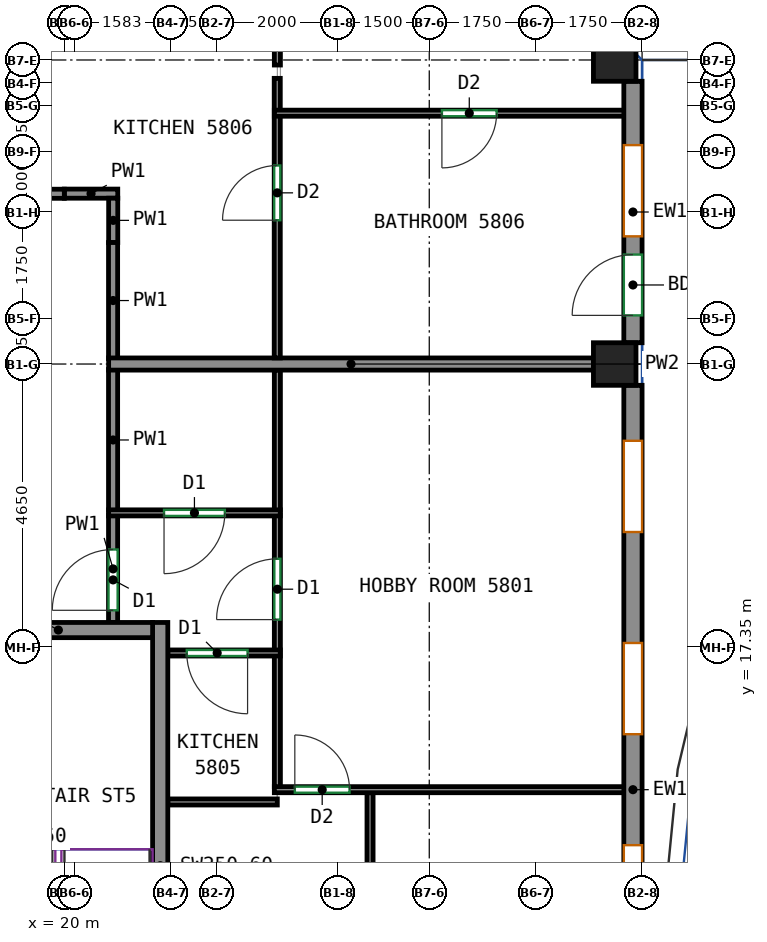
"""IFC4 building model, lengths in metres.
Left out: names, types, materials, properties, quantities, classifications, styles, units other than length and angle.
Written with IfcOpenShell. Run it as: python <this file> out.ifc"""

import sys

from ifc_helpers import new_model, si_unit, direction, frame, frame_2d, origin, origin_2d, place, context, subcontext, project, spatial, rectangle, extrude, source, transform, mapped, element, fill, save


model = new_model("IFC4")
c1 = context("Model", 3, precision=1e-05, world=origin(), true_north=direction((0.0, 1.0)))
c2 = subcontext(c1, "Body", "Model", "MODEL_VIEW")
j1 = project(units=[si_unit("LENGTHUNIT", "METRE"), si_unit("PLANEANGLEUNIT", "RADIAN")], contexts=[c1])
p1 = place(None, origin())
s1 = spatial("IfcSite", under=j1, at=p1, CompositionType="ELEMENT")
p2 = place(p1, origin())
s2 = spatial("IfcBuilding", under=s1, at=p2, CompositionType="ELEMENT")
p3 = place(p2, frame((0.0, 0.0, 242.4)))
s3 = spatial("IfcBuildingStorey", under=s2, at=p3, CompositionType="ELEMENT", Elevation=242.4)
m1 = source(origin(), c2, "Body", "SweptSolid", [
    extrude(rectangle(XDim=0.7, YDim=0.7, at=origin_2d()), origin(), (0.0, 0.0, 1.0), 3.12),
])
for number, where, z_axis, x_axis in (
    (1, (29.05, 22.0, 0.0), (0.0, 0.0, 1.0), (1.0, 0.0, 0.0)),
    (2, (29.05, 27.0, 0.0), (0.0, 0.0, 1.0), (1.0, 0.0, 0.0)),
):
    element("IfcColumn", number, at=place(p3, frame(where, z_axis=z_axis, x_axis=x_axis)), inside=s3, PredefinedType="COLUMN", context=c2, shape_type="MappedRepresentation", body=[
        mapped(m1, transform((0.0, 0.0, 0.0))),
    ])
m2 = source(origin(), c2, "Body", "SweptSolid", [
    extrude(rectangle(XDim=8.0, YDim=0.25, at=frame_2d((4.0, 0.0))), origin(), (0.0, 0.0, 1.0), 3.12),
])
p4 = place(p3, frame((21.575, 9.75, 0.0), z_axis=(0.0, 0.0, 1.0), x_axis=(0.0, 1.0, 0.0)))
e3 = element("IfcWall", 3, at=p4, inside=s3, PredefinedType="SHEAR", context=c2, shape_type="MappedRepresentation", body=[
    mapped(m2, transform((0.0, 0.0, 0.0))),
])
m3 = source(origin(), c2, "Body", "SweptSolid", [
    extrude(rectangle(XDim=3.1, YDim=0.25, at=frame_2d((1.55, 0.0))), origin(), (0.0, 0.0, 1.0), 3.12),
])
p5 = place(p3, frame((18.35, 17.625, 0.0), z_axis=(0.0, 0.0, 1.0), x_axis=(1.0, 0.0, 0.0)))
e4 = element("IfcWall", 4, at=p5, inside=s3, PredefinedType="SHEAR", context=c2, shape_type="MappedRepresentation", body=[
    mapped(m3, transform((0.0, 0.0, 0.0))),
])
m4 = source(origin(), c2, "Body", "SweptSolid", [
    extrude(rectangle(XDim=13.3, YDim=0.3, at=frame_2d((6.65, 0.0))), origin(), (0.0, 0.0, 1.0), 3.12),
])
p6 = place(p3, frame((29.35, 8.35, 0.0), z_axis=(0.0, 0.0, 1.0), x_axis=(0.0, 1.0, 0.0)))
e5 = element("IfcWall", 5, at=p6, inside=s3, PredefinedType="SOLIDWALL", context=c2, shape_type="MappedRepresentation", body=[
    mapped(m4, transform((0.0, 0.0, 0.0))),
])
p7 = place(p6, frame((0.913, 0.0, 0.8)))
e6 = element("IfcOpeningElement", 6, at=p7, cuts=e5, PredefinedType="OPENING", context=c2, shape_type="SweptSolid", body=[
    extrude(rectangle(XDim=1.5, YDim=2.05, at=frame_2d((0.75, 1.025))), frame((0.0, 0.16, 0.0), z_axis=(0.0, -1.0, 0.0), x_axis=(1.0, 0.0, 0.0)), (0.0, 0.0, 1.0), 0.32),
])
p8 = place(p6, frame((4.238, 0.0, 0.8)))
e7 = element("IfcOpeningElement", 7, at=p8, cuts=e5, PredefinedType="OPENING", context=c2, shape_type="SweptSolid", body=[
    extrude(rectangle(XDim=1.5, YDim=2.05, at=frame_2d((0.75, 1.025))), frame((0.0, 0.16, 0.0), z_axis=(0.0, -1.0, 0.0), x_axis=(1.0, 0.0, 0.0)), (0.0, 0.0, 1.0), 0.32),
])
p9 = place(p6, frame((7.562, 0.0, 0.8)))
e8 = element("IfcOpeningElement", 8, at=p9, cuts=e5, PredefinedType="OPENING", context=c2, shape_type="SweptSolid", body=[
    extrude(rectangle(XDim=1.5, YDim=2.05, at=frame_2d((0.75, 1.025))), frame((0.0, 0.16, 0.0), z_axis=(0.0, -1.0, 0.0), x_axis=(1.0, 0.0, 0.0)), (0.0, 0.0, 1.0), 0.32),
])
p10 = place(p6, frame((10.887, 0.0, 0.8)))
e9 = element("IfcOpeningElement", 9, at=p10, cuts=e5, PredefinedType="OPENING", context=c2, shape_type="SweptSolid", body=[
    extrude(rectangle(XDim=1.5, YDim=2.05, at=frame_2d((0.75, 1.025))), frame((0.0, 0.16, 0.0), z_axis=(0.0, -1.0, 0.0), x_axis=(1.0, 0.0, 0.0)), (0.0, 0.0, 1.0), 0.32),
])
m5 = source(origin(), c2, "Body", "SweptSolid", [
    extrude(rectangle(XDim=4.3, YDim=0.3, at=frame_2d((2.15, 0.0))), origin(), (0.0, 0.0, 1.0), 3.12),
])
p11 = place(p3, frame((29.35, 22.35, 0.0), z_axis=(0.0, 0.0, 1.0), x_axis=(0.0, 1.0, 0.0)))
e10 = element("IfcWall", 10, at=p11, inside=s3, PredefinedType="SOLIDWALL", context=c2, shape_type="MappedRepresentation", body=[
    mapped(m5, transform((0.0, 0.0, 0.0))),
])
p12 = place(p11, frame((1.75, 0.0, 0.8)))
e11 = element("IfcOpeningElement", 11, at=p12, cuts=e10, PredefinedType="OPENING", context=c2, shape_type="SweptSolid", body=[
    extrude(rectangle(XDim=1.5, YDim=2.05, at=frame_2d((0.75, 1.025))), frame((0.0, 0.16, 0.0), z_axis=(0.0, -1.0, 0.0), x_axis=(1.0, 0.0, 0.0)), (0.0, 0.0, 1.0), 0.32),
])
p13 = place(p11, frame((0.45, 0.0, 0.0)))
e12 = element("IfcOpeningElement", 12, at=p13, cuts=e10, PredefinedType="OPENING", context=c2, shape_type="SweptSolid", body=[
    extrude(rectangle(XDim=1.0, YDim=2.1, at=frame_2d((0.5, 1.05))), frame((0.0, 0.16, 0.0), z_axis=(0.0, -1.0, 0.0), x_axis=(1.0, 0.0, 0.0)), (0.0, 0.0, 1.0), 0.32),
])
p14 = place(p3, frame((20.8, 17.75, 0.0), z_axis=(0.0, 0.0, 1.0), x_axis=(0.0, 1.0, 0.0)))
e13 = element("IfcWall", 13, at=p14, inside=s3, PredefinedType="PARTITIONING", context=c2, shape_type="SweptSolid", body=[
    extrude(rectangle(XDim=1.762, YDim=0.15, at=frame_2d((0.881, 0.0))), origin(), (0.0, 0.0, 1.0), 3.12),
])
p15 = place(p14, frame((0.2, 0.0, 0.0)))
e14 = element("IfcOpeningElement", 14, at=p15, cuts=e13, PredefinedType="OPENING", context=c2, shape_type="SweptSolid", body=[
    extrude(rectangle(XDim=1.0, YDim=2.1, at=frame_2d((0.5, 1.05))), frame((0.0, 0.085, 0.0), z_axis=(0.0, -1.0, 0.0), x_axis=(1.0, 0.0, 0.0)), (0.0, 0.0, 1.0), 0.17),
])
p16 = place(p3, frame((20.8, 19.592, 0.0), z_axis=(0.0, 0.0, 1.0), x_axis=(0.0, 1.0, 0.0)))
e15 = element("IfcWall", 15, at=p16, inside=s3, PredefinedType="PARTITIONING", context=c2, shape_type="SweptSolid", body=[
    extrude(rectangle(XDim=2.318, YDim=0.15, at=frame_2d((1.159, 0.0))), origin(), (0.0, 0.0, 1.0), 3.12),
])
p17 = place(p3, frame((20.877, 24.802, 0.0), z_axis=(0.0, 0.0, 1.0), x_axis=(-1.0, 0.0, 0.0)))
e16 = element("IfcWall", 16, at=p17, inside=s3, PredefinedType="PARTITIONING", context=c2, shape_type="SweptSolid", body=[
    extrude(rectangle(XDim=0.879, YDim=0.15, at=frame_2d((0.439, 0.0))), origin(), (0.0, 0.0, 1.0), 3.12),
])
p18 = place(p3, frame((20.802, 23.998, 0.0), z_axis=(0.0, 0.0, 1.0), x_axis=(0.0, 1.0, 0.0)))
e17 = element("IfcWall", 17, at=p18, inside=s3, PredefinedType="PARTITIONING", context=c2, shape_type="SweptSolid", body=[
    extrude(rectangle(XDim=0.729, YDim=0.15, at=frame_2d((0.365, 0.0))), origin(), (0.0, 0.0, 1.0), 3.12),
])
p19 = place(p3, frame((20.8, 22.09, 0.0), z_axis=(0.0, 0.0, 1.0), x_axis=(0.0, 1.0, 0.0)))
e18 = element("IfcWall", 18, at=p19, inside=s3, PredefinedType="PARTITIONING", context=c2, shape_type="SweptSolid", body=[
    extrude(rectangle(XDim=1.908, YDim=0.15, at=frame_2d((0.954, 0.0))), origin(), (0.0, 0.0, 1.0), 3.12),
])
p20 = place(p3, frame((-16.075, 24.8, 0.0), z_axis=(0.0, 0.0, 1.0), x_axis=(1.0, 0.0, 0.0)))
e19 = element("IfcWall", 19, at=p20, inside=s3, PredefinedType="PARTITIONING", context=c2, shape_type="SweptSolid", body=[
    extrude(rectangle(XDim=36.073, YDim=0.15, at=frame_2d((18.037, 0.0))), origin(), (0.0, 0.0, 1.0), 3.12),
])
p21 = place(p20, frame((14.274, 0.0, 0.0)))
e20 = element("IfcOpeningElement", 20, at=p21, cuts=e19, PredefinedType="OPENING", context=c2, shape_type="SweptSolid", body=[
    extrude(rectangle(XDim=0.9, YDim=2.1, at=frame_2d((0.45, 1.05))), frame((0.0, 0.085, 0.0), z_axis=(0.0, -1.0, 0.0), x_axis=(1.0, 0.0, 0.0)), (0.0, 0.0, 1.0), 0.17),
])
p22 = place(p20, frame((28.875, 0.0, 0.0)))
e21 = element("IfcOpeningElement", 21, at=p22, cuts=e19, PredefinedType="OPENING", context=c2, shape_type="SweptSolid", body=[
    extrude(rectangle(XDim=1.0, YDim=2.1, at=frame_2d((0.5, 1.05))), frame((0.0, 0.085, 0.0), z_axis=(0.0, -1.0, 0.0), x_axis=(1.0, 0.0, 0.0)), (0.0, 0.0, 1.0), 0.17),
])
p23 = place(p3, frame((25.026, 8.1, 0.0), z_axis=(0.0, 0.0, 1.0), x_axis=(0.0, 1.0, 0.0)))
e22 = element("IfcWall", 22, at=p23, inside=s3, PredefinedType="PARTITIONING", context=c2, shape_type="SweptSolid", body=[
    extrude(rectangle(XDim=6.85, YDim=0.1, at=frame_2d((3.425, 0.0))), origin(), (0.0, 0.0, 1.0), 3.12),
])
p24 = place(p23, frame((1.613, 0.0, 0.0)))
e23 = element("IfcOpeningElement", 23, at=p24, cuts=e22, PredefinedType="OPENING", context=c2, shape_type="SweptSolid", body=[
    extrude(rectangle(XDim=0.9, YDim=2.1, at=frame_2d((0.45, 1.05))), frame((0.0, 0.06, 0.0), z_axis=(0.0, -1.0, 0.0), x_axis=(1.0, 0.0, 0.0)), (0.0, 0.0, 1.0), 0.12),
])
p25 = place(p3, frame((23.452, 15.0, 0.0), z_axis=(0.0, 0.0, 1.0), x_axis=(1.0, 0.0, 0.0)))
e24 = element("IfcWall", 24, at=p25, inside=s3, PredefinedType="PARTITIONING", context=c2, shape_type="SweptSolid", body=[
    extrude(rectangle(XDim=5.798, YDim=0.1, at=frame_2d((2.899, 0.0))), origin(), (0.0, 0.0, 1.0), 3.12),
])
p26 = place(p25, frame((0.337, 0.0, 0.0)))
e25 = element("IfcOpeningElement", 25, at=p26, cuts=e24, PredefinedType="OPENING", context=c2, shape_type="SweptSolid", body=[
    extrude(rectangle(XDim=0.9, YDim=2.1, at=frame_2d((0.45, 1.05))), frame((0.0, 0.06, 0.0), z_axis=(0.0, -1.0, 0.0), x_axis=(1.0, 0.0, 0.0)), (0.0, 0.0, 1.0), 0.12),
])
p27 = place(p3, frame((23.501, 14.798, 0.0), z_axis=(0.0, 0.0, 1.0), x_axis=(-1.0, 0.0, 0.0)))
e26 = element("IfcWall", 26, at=p27, inside=s3, PredefinedType="PARTITIONING", context=c2, shape_type="SweptSolid", body=[
    extrude(rectangle(XDim=1.801, YDim=0.1, at=frame_2d((0.9, 0.0))), origin(), (0.0, 0.0, 1.0), 3.12),
])
p28 = place(p3, frame((23.502, 15.05, 0.0), z_axis=(0.0, 0.0, 1.0), x_axis=(0.0, 1.0, 0.0)))
e27 = element("IfcWall", 27, at=p28, inside=s3, PredefinedType="PARTITIONING", context=c2, shape_type="SweptSolid", body=[
    extrude(rectangle(XDim=2.158, YDim=0.1, at=frame_2d((1.079, 0.0))), origin(), (0.0, 0.0, 1.0), 3.12),
])
p29 = place(p3, frame((23.502, 17.288, 0.0), z_axis=(0.0, 0.0, 1.0), x_axis=(0.0, 1.0, 0.0)))
e28 = element("IfcWall", 28, at=p29, inside=s3, PredefinedType="PARTITIONING", context=c2, shape_type="SweptSolid", body=[
    extrude(rectangle(XDim=2.224, YDim=0.1, at=frame_2d((1.112, 0.0))), origin(), (0.0, 0.0, 1.0), 3.12),
])
p30 = place(p29, frame((0.509, 0.0, 0.0)))
e29 = element("IfcOpeningElement", 29, at=p30, cuts=e28, PredefinedType="OPENING", context=c2, shape_type="SweptSolid", body=[
    extrude(rectangle(XDim=1.0, YDim=2.1, at=frame_2d((0.5, 1.05))), frame((0.0, 0.06, 0.0), z_axis=(0.0, -1.0, 0.0), x_axis=(1.0, 0.0, 0.0)), (0.0, 0.0, 1.0), 0.12),
])
p31 = place(p3, frame((23.502, 19.592, 0.0), z_axis=(0.0, 0.0, 1.0), x_axis=(0.0, 1.0, 0.0)))
e30 = element("IfcWall", 30, at=p31, inside=s3, PredefinedType="PARTITIONING", context=c2, shape_type="SweptSolid", body=[
    extrude(rectangle(XDim=2.308, YDim=0.1, at=frame_2d((1.154, 0.0))), origin(), (0.0, 0.0, 1.0), 3.12),
])
p32 = place(p3, frame((23.55, 17.248, 0.0), z_axis=(0.0, 0.0, 1.0), x_axis=(-1.0, 0.0, 0.0)))
e31 = element("IfcWall", 31, at=p32, inside=s3, PredefinedType="PARTITIONING", context=c2, shape_type="SweptSolid", body=[
    extrude(rectangle(XDim=1.85, YDim=0.1, at=frame_2d((0.925, 0.0))), origin(), (0.0, 0.0, 1.0), 3.12),
])
p33 = place(p32, frame((0.538, 0.0, 0.0)))
e32 = element("IfcOpeningElement", 32, at=p33, cuts=e31, PredefinedType="OPENING", context=c2, shape_type="SweptSolid", body=[
    extrude(rectangle(XDim=1.0, YDim=2.1, at=frame_2d((0.5, 1.05))), frame((0.0, 0.06, 0.0), z_axis=(0.0, -1.0, 0.0), x_axis=(1.0, 0.0, 0.0)), (0.0, 0.0, 1.0), 0.12),
])
p34 = place(p3, frame((23.55, 19.552, 0.0), z_axis=(0.0, 0.0, 1.0), x_axis=(-1.0, 0.0, 0.0)))
e33 = element("IfcWall", 33, at=p34, inside=s3, PredefinedType="PARTITIONING", context=c2, shape_type="SweptSolid", body=[
    extrude(rectangle(XDim=2.823, YDim=0.1, at=frame_2d((1.412, 0.0))), origin(), (0.0, 0.0, 1.0), 3.12),
])
p35 = place(p34, frame((0.912, 0.0, 0.0)))
e34 = element("IfcOpeningElement", 34, at=p35, cuts=e33, PredefinedType="OPENING", context=c2, shape_type="SweptSolid", body=[
    extrude(rectangle(XDim=1.0, YDim=2.1, at=frame_2d((0.5, 1.05))), frame((0.0, 0.06, 0.0), z_axis=(0.0, -1.0, 0.0), x_axis=(1.0, 0.0, 0.0)), (0.0, 0.0, 1.0), 0.12),
])
p36 = place(p3, frame((20.727, 22.0, 0.0), z_axis=(0.0, 0.0, 1.0), x_axis=(1.0, 0.0, 0.0)))
e35 = element("IfcWall", 35, at=p36, inside=s3, PredefinedType="PARTITIONING", context=c2, shape_type="SweptSolid", body=[
    extrude(rectangle(XDim=7.973, YDim=0.2, at=frame_2d((3.986, 0.0))), origin(), (0.0, 0.0, 1.0), 2.57),
])
p37 = place(p3, frame((23.5, 22.1, 0.0), z_axis=(0.0, 0.0, 1.0), x_axis=(0.0, 1.0, 0.0)))
e36 = element("IfcWall", 36, at=p37, inside=s3, PredefinedType="PARTITIONING", context=c2, shape_type="SweptSolid", body=[
    extrude(rectangle(XDim=3.985, YDim=0.1, at=frame_2d((1.992, 0.0))), origin(), (0.0, 0.0, 1.0), 3.12),
])
p38 = place(p37, frame((2.265, 0.0, 0.0)))
e37 = element("IfcOpeningElement", 37, at=p38, cuts=e36, PredefinedType="OPENING", context=c2, shape_type="SweptSolid", body=[
    extrude(rectangle(XDim=0.9, YDim=2.1, at=frame_2d((0.45, 1.05))), frame((0.0, 0.06, 0.0), z_axis=(0.0, -1.0, 0.0), x_axis=(1.0, 0.0, 0.0)), (0.0, 0.0, 1.0), 0.12),
])
p39 = place(p3, frame((23.502, 26.917, 0.0), z_axis=(0.0, 0.0, 1.0), x_axis=(0.0, 1.0, 0.0)))
e38 = element("IfcWall", 38, at=p39, inside=s3, PredefinedType="PARTITIONING", context=c2, shape_type="SweptSolid", body=[
    extrude(rectangle(XDim=0.535, YDim=0.1, at=frame_2d((0.268, 0.0))), origin(), (0.0, 0.0, 1.0), 3.12),
])
p40 = place(p3, frame((23.5, 26.165, 0.0), z_axis=(0.0, 0.0, 1.0), x_axis=(0.0, 1.0, 0.0)))
e39 = element("IfcWall", 39, at=p40, inside=s3, PredefinedType="PARTITIONING", context=c2, shape_type="SweptSolid", body=[
    extrude(rectangle(XDim=0.533, YDim=0.1, at=frame_2d((0.267, 0.0))), origin(), (0.0, 0.0, 1.0), 3.12),
])
p41 = place(p3, frame((29.25, 26.125, 0.0), z_axis=(0.0, 0.0, 1.0), x_axis=(-1.0, 0.0, 0.0)))
e40 = element("IfcWall", 40, at=p41, inside=s3, PredefinedType="PARTITIONING", context=c2, shape_type="SweptSolid", body=[
    extrude(rectangle(XDim=5.798, YDim=0.1, at=frame_2d((2.899, 0.0))), origin(), (0.0, 0.0, 1.0), 3.12),
])
p42 = place(p41, frame((2.142, 0.0, 0.0)))
e41 = element("IfcOpeningElement", 41, at=p42, cuts=e40, PredefinedType="OPENING", context=c2, shape_type="SweptSolid", body=[
    extrude(rectangle(XDim=0.9, YDim=2.1, at=frame_2d((0.45, 1.05))), frame((0.0, 0.06, 0.0), z_axis=(0.0, -1.0, 0.0), x_axis=(1.0, 0.0, 0.0)), (0.0, 0.0, 1.0), 0.12),
])
p43 = place(p8, origin())
e42 = element("IfcWindow", 42, at=p43, inside=s3, PartitioningType="SINGLE_PANEL", PredefinedType="WINDOW", context=c2, shape_type="SweptSolid", body=[
    extrude(rectangle(XDim=1.5, YDim=2.05, at=frame_2d((0.75, 1.025))), frame((0.0, 0.03, 0.0), z_axis=(0.0, -1.0, 0.0), x_axis=(1.0, 0.0, 0.0)), (0.0, 0.0, 1.0), 0.06),
])
fill(e7, e42)
p44 = place(p9, origin())
e43 = element("IfcWindow", 43, at=p44, inside=s3, PartitioningType="SINGLE_PANEL", PredefinedType="WINDOW", context=c2, shape_type="SweptSolid", body=[
    extrude(rectangle(XDim=1.5, YDim=2.05, at=frame_2d((0.75, 1.025))), frame((0.0, 0.03, 0.0), z_axis=(0.0, -1.0, 0.0), x_axis=(1.0, 0.0, 0.0)), (0.0, 0.0, 1.0), 0.06),
])
fill(e8, e43)
p45 = place(p10, origin())
e44 = element("IfcWindow", 44, at=p45, inside=s3, PartitioningType="SINGLE_PANEL", PredefinedType="WINDOW", context=c2, shape_type="SweptSolid", body=[
    extrude(rectangle(XDim=1.5, YDim=2.05, at=frame_2d((0.75, 1.025))), frame((0.0, 0.03, 0.0), z_axis=(0.0, -1.0, 0.0), x_axis=(1.0, 0.0, 0.0)), (0.0, 0.0, 1.0), 0.06),
])
fill(e9, e44)
p46 = place(p12, origin())
e45 = element("IfcWindow", 45, at=p46, inside=s3, PartitioningType="SINGLE_PANEL", PredefinedType="WINDOW", context=c2, shape_type="SweptSolid", body=[
    extrude(rectangle(XDim=1.5, YDim=2.05, at=frame_2d((0.75, 1.025))), frame((0.0, 0.03, 0.0), z_axis=(0.0, -1.0, 0.0), x_axis=(1.0, 0.0, 0.0)), (0.0, 0.0, 1.0), 0.06),
])
fill(e11, e45)
p47 = place(p13, origin())
e46 = element("IfcDoor", 46, at=p47, inside=s3, OperationType="SINGLE_SWING_LEFT", PredefinedType="DOOR", context=c2, shape_type="SweptSolid", body=[
    extrude(rectangle(XDim=1.0, YDim=2.1, at=frame_2d((0.5, 1.05))), frame((0.0, 0.025, 0.0), z_axis=(0.0, -1.0, 0.0), x_axis=(1.0, 0.0, 0.0)), (0.0, 0.0, 1.0), 0.05),
])
fill(e12, e46)
p48 = place(p26, origin())
e47 = element("IfcDoor", 47, at=p48, inside=s3, OperationType="SINGLE_SWING_LEFT", PredefinedType="DOOR", context=c2, shape_type="SweptSolid", body=[
    extrude(rectangle(XDim=0.9, YDim=2.1, at=frame_2d((0.45, 1.05))), frame((0.0, 0.025, 0.0), z_axis=(0.0, -1.0, 0.0), x_axis=(1.0, 0.0, 0.0)), (0.0, 0.0, 1.0), 0.05),
])
fill(e25, e47)
p49 = place(p33, origin())
e48 = element("IfcDoor", 48, at=p49, inside=s3, OperationType="SINGLE_SWING_LEFT", PredefinedType="DOOR", context=c2, shape_type="SweptSolid", body=[
    extrude(rectangle(XDim=1.0, YDim=2.1, at=frame_2d((0.5, 1.05))), frame((0.0, 0.025, 0.0), z_axis=(0.0, -1.0, 0.0), x_axis=(1.0, 0.0, 0.0)), (0.0, 0.0, 1.0), 0.05),
])
fill(e32, e48)
p50 = place(p30, origin())
e49 = element("IfcDoor", 49, at=p50, inside=s3, OperationType="SINGLE_SWING_LEFT", PredefinedType="DOOR", context=c2, shape_type="SweptSolid", body=[
    extrude(rectangle(XDim=1.0, YDim=2.1, at=frame_2d((0.5, 1.05))), frame((0.0, 0.025, 0.0), z_axis=(0.0, -1.0, 0.0), x_axis=(1.0, 0.0, 0.0)), (0.0, 0.0, 1.0), 0.05),
])
fill(e29, e49)
p51 = place(p15, origin())
e50 = element("IfcDoor", 50, at=p51, inside=s3, OperationType="SINGLE_SWING_LEFT", PredefinedType="DOOR", context=c2, shape_type="SweptSolid", body=[
    extrude(rectangle(XDim=1.0, YDim=2.1, at=frame_2d((0.5, 1.05))), frame((0.0, 0.025, 0.0), z_axis=(0.0, -1.0, 0.0), x_axis=(1.0, 0.0, 0.0)), (0.0, 0.0, 1.0), 0.05),
])
fill(e14, e50)
p52 = place(p35, origin())
e51 = element("IfcDoor", 51, at=p52, inside=s3, OperationType="SINGLE_SWING_RIGHT", PredefinedType="DOOR", context=c2, shape_type="SweptSolid", body=[
    extrude(rectangle(XDim=1.0, YDim=2.1, at=frame_2d((0.5, 1.05))), frame((0.0, 0.025, 0.0), z_axis=(0.0, -1.0, 0.0), x_axis=(1.0, 0.0, 0.0)), (0.0, 0.0, 1.0), 0.05),
])
fill(e34, e51)
p53 = place(p38, origin())
e52 = element("IfcDoor", 52, at=p53, inside=s3, OperationType="SINGLE_SWING_LEFT", PredefinedType="DOOR", context=c2, shape_type="SweptSolid", body=[
    extrude(rectangle(XDim=0.9, YDim=2.1, at=frame_2d((0.45, 1.05))), frame((0.0, 0.025, 0.0), z_axis=(0.0, -1.0, 0.0), x_axis=(1.0, 0.0, 0.0)), (0.0, 0.0, 1.0), 0.05),
])
fill(e37, e52)
p54 = place(p42, origin())
e53 = element("IfcDoor", 53, at=p54, inside=s3, OperationType="SINGLE_SWING_RIGHT", PredefinedType="DOOR", context=c2, shape_type="SweptSolid", body=[
    extrude(rectangle(XDim=0.9, YDim=2.1, at=frame_2d((0.45, 1.05))), frame((0.0, 0.025, 0.0), z_axis=(0.0, -1.0, 0.0), x_axis=(1.0, 0.0, 0.0)), (0.0, 0.0, 1.0), 0.05),
])
fill(e41, e53)
save(model, sys.argv[1])
